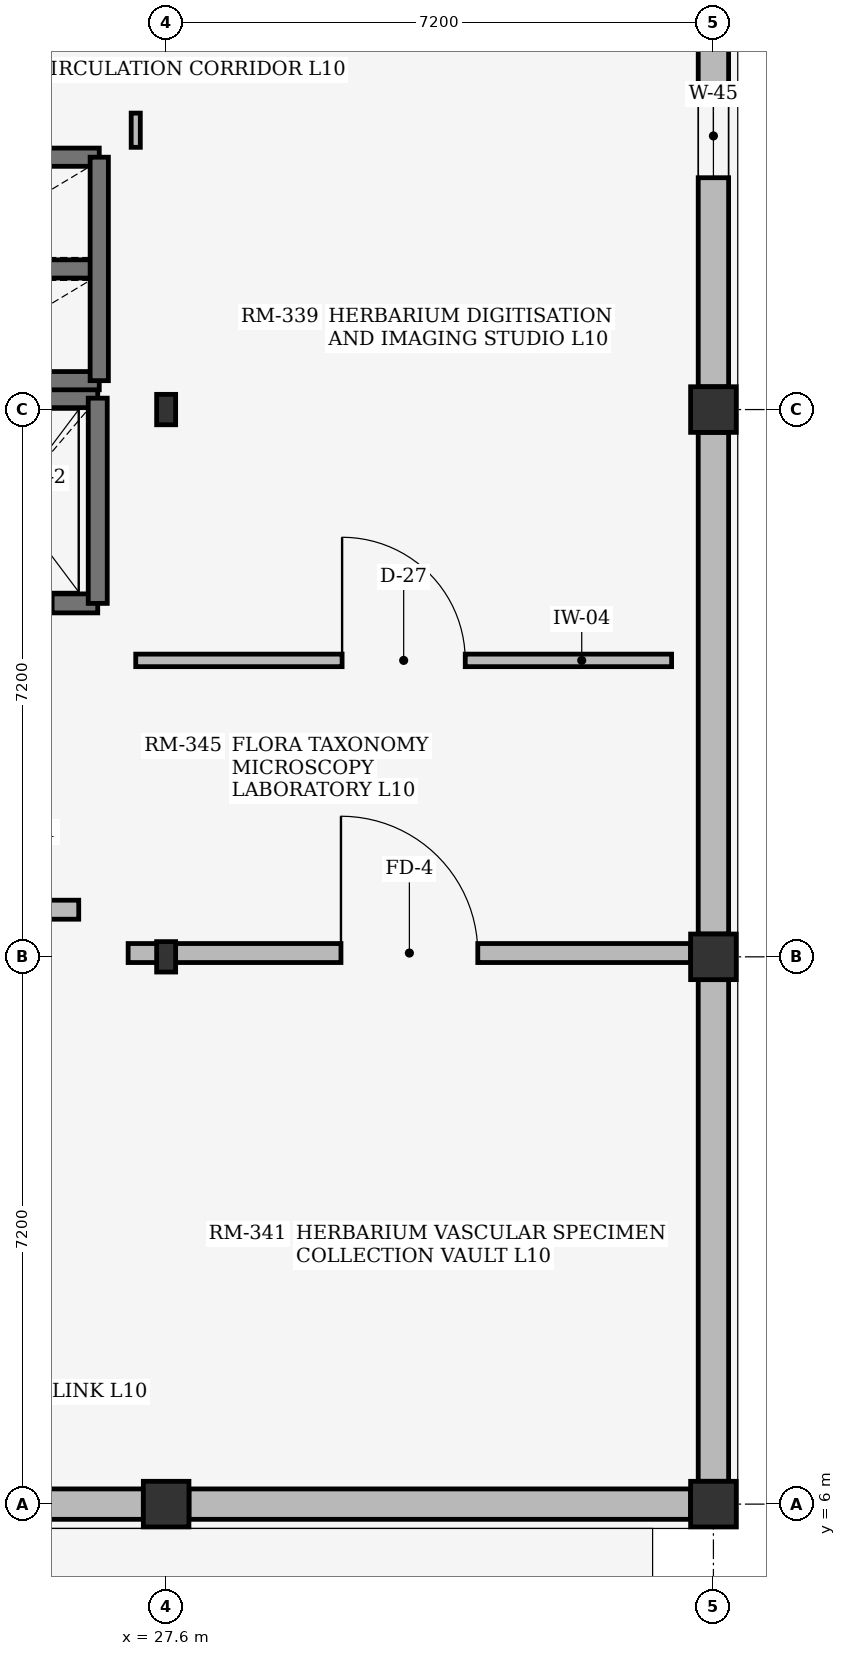
"""IFC4 building model, lengths in metres.
Left out: names, types, materials, properties, quantities, classifications, styles, units other than length and angle.
Written with IfcOpenShell. Run it as: python <this file> out.ifc"""

import sys

from ifc_helpers import new_model, si_unit, direction, frame, frame_2d, origin, origin_2d, place, context, subcontext, project, spatial, rectangle, i_section, extrude, element, fill, save


model = new_model("IFC4")
c1 = context("Model", 3, precision=1e-05, world=origin(), true_north=direction((0.0, 1.0)))
c2 = subcontext(c1, "Body", "Model", "MODEL_VIEW")
j1 = project(units=[si_unit("LENGTHUNIT", "METRE"), si_unit("PLANEANGLEUNIT", "RADIAN")], contexts=[c1])
p1 = place(None, origin())
s1 = spatial("IfcSite", under=j1, at=p1, CompositionType="ELEMENT")
p2 = place(p1, origin())
s2 = spatial("IfcBuilding", under=s1, at=p2, CompositionType="ELEMENT")
p3 = place(p2, frame((0.0, 0.0, 40.5)))
s3 = spatial("IfcBuildingStorey", under=s2, at=p3, CompositionType="ELEMENT", Elevation=40.5)
p4 = place(p3, frame((27.6, 6.0, 0.0), z_axis=(0.0, 0.0, 1.0), x_axis=(1.0, 0.0, 0.0)))
e1 = element("IfcColumn", 1, at=p4, inside=s3, PredefinedType="COLUMN", context=c2, shape_type="SweptSolid", body=[
    extrude(rectangle(XDim=0.6, YDim=0.6, at=origin_2d()), origin(), (0.0, 0.0, 1.0), 3.68),
])
for number, where, z_axis, x_axis in (
    (2, (27.6, 13.2, 0.0), (0.0, 0.0, 1.0), (1.0, 0.0, 0.0)),
    (3, (27.6, 20.4, 0.0), (0.0, 0.0, 1.0), (1.0, 0.0, 0.0)),
):
    element("IfcColumn", number, at=place(p3, frame(where, z_axis=z_axis, x_axis=x_axis)), inside=s3, PredefinedType="COLUMN", context=c2, shape_type="SweptSolid", body=[
        extrude(i_section(OverallWidth=0.25, OverallDepth=0.4, WebThickness=0.01, FlangeThickness=0.013, at=origin_2d()), origin(), (0.0, 0.0, 1.0), 3.68),
    ])
for number, where, z_axis, x_axis in (
    (4, (34.8, 6.0, 0.0), (0.0, 0.0, 1.0), (1.0, 0.0, 0.0)),
    (5, (34.8, 13.2, 0.0), (0.0, 0.0, 1.0), (1.0, 0.0, 0.0)),
    (6, (34.8, 20.4, 0.0), (0.0, 0.0, 1.0), (1.0, 0.0, 0.0)),
):
    element("IfcColumn", number, at=place(p3, frame(where, z_axis=z_axis, x_axis=x_axis)), inside=s3, PredefinedType="COLUMN", context=c2, shape_type="SweptSolid", body=[
        extrude(rectangle(XDim=0.6, YDim=0.6, at=origin_2d()), origin(), (0.0, 0.0, 1.0), 3.68),
    ])
for number, where, z_axis, x_axis in (
    (7, (20.7, 6.0, 0.0), (0.0, 0.0, 1.0), (1.0, 0.0, 0.0)),
    (8, (27.9, 6.0, 0.0), (0.0, 0.0, 1.0), (1.0, 0.0, 0.0)),
):
    element("IfcWall", number, at=place(p3, frame(where, z_axis=z_axis, x_axis=x_axis)), inside=s3, PredefinedType="STANDARD", context=c2, shape_type="SweptSolid", body=[
        extrude(rectangle(XDim=6.6, YDim=0.4, at=frame_2d((3.3, 0.0))), origin(), (0.0, 0.0, 1.0), 3.16),
    ])
p5 = place(p3, frame((34.8, 6.3, 0.0), z_axis=(0.0, 0.0, 1.0), x_axis=(0.0, 1.0, 0.0)))
e9 = element("IfcWall", 9, at=p5, inside=s3, PredefinedType="STANDARD", context=c2, shape_type="SweptSolid", body=[
    extrude(rectangle(XDim=6.6, YDim=0.4, at=frame_2d((3.3, 0.0))), origin(), (0.0, 0.0, 1.0), 3.16),
])
p6 = place(p3, frame((34.8, 13.5, 0.0), z_axis=(0.0, 0.0, 1.0), x_axis=(0.0, 1.0, 0.0)))
e10 = element("IfcWall", 10, at=p6, inside=s3, PredefinedType="STANDARD", context=c2, shape_type="SweptSolid", body=[
    extrude(rectangle(XDim=6.6, YDim=0.4, at=frame_2d((3.3, 0.0))), origin(), (0.0, 0.0, 1.0), 3.16),
])
p7 = place(p3, frame((34.8, 20.7, 0.0), z_axis=(0.0, 0.0, 1.0), x_axis=(0.0, 1.0, 0.0)))
e11 = element("IfcWall", 11, at=p7, inside=s3, PredefinedType="STANDARD", context=c2, shape_type="SweptSolid", body=[
    extrude(rectangle(XDim=6.6, YDim=0.4, at=frame_2d((3.3, 0.0))), origin(), (0.0, 0.0, 1.0), 3.16),
])
p8 = place(p7, frame((2.75, 0.0, 0.75)))
e12 = element("IfcOpeningElement", 12, at=p8, cuts=e11, PredefinedType="OPENING", context=c2, shape_type="SweptSolid", body=[
    extrude(rectangle(XDim=1.1, YDim=1.25, at=frame_2d((0.55, 0.625))), frame((0.0, 0.21, 0.0), z_axis=(0.0, -1.0, 0.0), x_axis=(1.0, 0.0, 0.0)), (0.0, 0.0, 1.0), 0.42),
])
p9 = place(p3, frame((24.4, 17.85, 0.0), z_axis=(0.0, 0.0, 1.0), x_axis=(1.0, 0.0, 0.0)))
e13 = element("IfcWall", 13, at=p9, inside=s3, PredefinedType="SHEAR", context=c2, shape_type="SweptSolid", body=[
    extrude(rectangle(XDim=2.3, YDim=0.25, at=frame_2d((1.15, 0.0))), origin(), (0.0, 0.0, 1.0), 3.68),
])
p10 = place(p9, frame((0.6, 0.0, 0.0)))
e14 = element("IfcOpeningElement", 14, at=p10, cuts=e13, PredefinedType="OPENING", context=c2, shape_type="SweptSolid", body=[
    extrude(rectangle(XDim=1.1, YDim=2.2, at=frame_2d((0.55, 1.1))), frame((0.0, 0.135, 0.0), z_axis=(0.0, -1.0, 0.0), x_axis=(1.0, 0.0, 0.0)), (0.0, 0.0, 1.0), 0.27),
])
p11 = place(p3, frame((24.4, 20.55, 0.0), z_axis=(0.0, 0.0, 1.0), x_axis=(1.0, 0.0, 0.0)))
e15 = element("IfcWall", 15, at=p11, inside=s3, PredefinedType="SHEAR", context=c2, shape_type="SweptSolid", body=[
    extrude(rectangle(XDim=2.3, YDim=0.25, at=frame_2d((1.15, 0.0))), origin(), (0.0, 0.0, 1.0), 3.68),
])
p12 = place(p3, frame((26.7, 17.85, 0.0), z_axis=(0.0, 0.0, 1.0), x_axis=(0.0, 1.0, 0.0)))
e16 = element("IfcWall", 16, at=p12, inside=s3, PredefinedType="SHEAR", context=c2, shape_type="SweptSolid", body=[
    extrude(rectangle(XDim=2.7, YDim=0.25, at=frame_2d((1.35, 0.0))), origin(), (0.0, 0.0, 1.0), 3.68),
])
for number, where, z_axis, x_axis in (
    (17, (24.48, 20.78, 0.0), (0.0, 0.0, 1.0), (1.0, 0.0, 0.0)),
    (18, (24.48, 22.25, 0.0), (0.0, 0.0, 1.0), (1.0, 0.0, 0.0)),
    (19, (24.48, 23.72, 0.0), (0.0, 0.0, 1.0), (1.0, 0.0, 0.0)),
):
    element("IfcWall", number, at=place(p3, frame(where, z_axis=z_axis, x_axis=x_axis)), inside=s3, PredefinedType="SHEAR", context=c2, shape_type="SweptSolid", body=[
        extrude(rectangle(XDim=2.24, YDim=0.24, at=frame_2d((1.12, 0.0))), origin(), (0.0, 0.0, 1.0), 3.68),
    ])
p13 = place(p3, frame((26.72, 20.78, 0.0), z_axis=(0.0, 0.0, 1.0), x_axis=(0.0, 1.0, 0.0)))
e20 = element("IfcWall", 20, at=p13, inside=s3, PredefinedType="SHEAR", context=c2, shape_type="SweptSolid", body=[
    extrude(rectangle(XDim=2.94, YDim=0.24, at=frame_2d((1.47, 0.0))), origin(), (0.0, 0.0, 1.0), 3.68),
])
p14 = place(p3, frame((24.45, 13.82, 0.0), z_axis=(0.0, 0.0, 1.0), x_axis=(1.0, 0.0, 0.0)))
e21 = element("IfcWall", 21, at=p14, inside=s3, PredefinedType="SOLIDWALL", context=c2, shape_type="SweptSolid", body=[
    extrude(rectangle(XDim=2.0, YDim=0.25, at=frame_2d((1.0, 0.0))), origin(), (0.0, 0.0, 1.0), 3.66),
])
p15 = place(p3, frame((27.2, 17.1, 0.0), z_axis=(0.0, 0.0, 1.0), x_axis=(1.0, 0.0, 0.0)))
e22 = element("IfcWall", 22, at=p15, inside=s3, PredefinedType="PARTITIONING", context=c2, shape_type="SweptSolid", body=[
    extrude(rectangle(XDim=7.05, YDim=0.165, at=frame_2d((3.525, 0.0))), origin(), (0.0, 0.0, 1.0), 3.66),
])
p16 = place(p15, frame((2.715, 0.0, 0.0)))
e23 = element("IfcOpeningElement", 23, at=p16, cuts=e22, PredefinedType="OPENING", context=c2, shape_type="SweptSolid", body=[
    extrude(rectangle(XDim=1.62, YDim=2.28, at=frame_2d((0.81, 1.14))), frame((0.0, 0.093, 0.0), z_axis=(0.0, -1.0, 0.0), x_axis=(1.0, 0.0, 0.0)), (0.0, 0.0, 1.0), 0.185),
])
p17 = place(p3, frame((27.1, 13.25, 0.0), z_axis=(0.0, 0.0, 1.0), x_axis=(1.0, 0.0, 0.0)))
e24 = element("IfcWall", 24, at=p17, inside=s3, PredefinedType="SOLIDWALL", context=c2, shape_type="SweptSolid", body=[
    extrude(rectangle(XDim=7.4, YDim=0.25, at=frame_2d((3.7, 0.0))), origin(), (0.0, 0.0, 1.0), 3.17),
])
p18 = place(p17, frame((2.8, 0.0, 0.0)))
e25 = element("IfcOpeningElement", 25, at=p18, cuts=e24, PredefinedType="OPENING", context=c2, shape_type="SweptSolid", body=[
    extrude(rectangle(XDim=1.8, YDim=2.25, at=frame_2d((0.9, 1.125))), frame((0.0, 0.135, 0.0), z_axis=(0.0, -1.0, 0.0), x_axis=(1.0, 0.0, 0.0)), (0.0, 0.0, 1.0), 0.27),
])
p19 = place(p3, frame((27.2, 24.3, 0.0), z_axis=(0.0, 0.0, 1.0), x_axis=(0.0, -1.0, 0.0)))
e26 = element("IfcWall", 26, at=p19, inside=s3, PredefinedType="PARTITIONING", context=c2, shape_type="SweptSolid", body=[
    extrude(rectangle(XDim=0.45, YDim=0.12, at=frame_2d((0.225, 0.0))), origin(), (0.0, 0.0, 1.0), 3.66),
])
p20 = place(p8, origin())
e27 = element("IfcWindow", 27, at=p20, inside=s3, PartitioningType="SINGLE_PANEL", PredefinedType="WINDOW", context=c2, shape_type="SweptSolid", body=[
    extrude(rectangle(XDim=1.1, YDim=1.25, at=frame_2d((0.55, 0.625))), frame((0.0, 0.03, 0.0), z_axis=(0.0, -1.0, 0.0), x_axis=(1.0, 0.0, 0.0)), (0.0, 0.0, 1.0), 0.06),
])
fill(e12, e27)
p21 = place(p16, origin())
e28 = element("IfcDoor", 28, at=p21, inside=s3, OperationType="DOUBLE_DOOR_SINGLE_SWING", PredefinedType="DOOR", context=c2, shape_type="SweptSolid", body=[
    extrude(rectangle(XDim=1.62, YDim=2.28, at=frame_2d((0.81, 1.14))), frame((0.0, 0.025, 0.0), z_axis=(0.0, -1.0, 0.0), x_axis=(1.0, 0.0, 0.0)), (0.0, 0.0, 1.0), 0.05),
])
fill(e23, e28)
p22 = place(p18, origin())
e29 = element("IfcDoor", 29, at=p22, inside=s3, OperationType="DOUBLE_DOOR_SINGLE_SWING", PredefinedType="DOOR", context=c2, shape_type="SweptSolid", body=[
    extrude(rectangle(XDim=1.8, YDim=2.25, at=frame_2d((0.9, 1.125))), frame((0.0, 0.025, 0.0), z_axis=(0.0, -1.0, 0.0), x_axis=(1.0, 0.0, 0.0)), (0.0, 0.0, 1.0), 0.05),
])
fill(e25, e29)
save(model, sys.argv[1])
